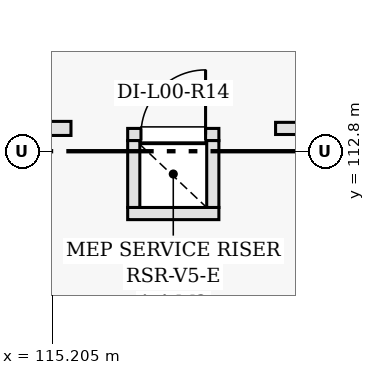
"""IFC4 building model, lengths in metres.
Left out: names, types, materials, properties, quantities, classifications, styles, units other than length and angle.
Written with IfcOpenShell. Run it as: python <this file> out.ifc"""

import sys

from ifc_helpers import new_model, si_unit, direction, frame, frame_2d, origin, place, context, subcontext, project, spatial, rectangle, extrude, element, fill, save


model = new_model("IFC4")
c1 = context("Model", 3, precision=1e-05, world=origin(), true_north=direction((0.0, 1.0)))
c2 = subcontext(c1, "Body", "Model", "MODEL_VIEW")
j1 = project(units=[si_unit("LENGTHUNIT", "METRE"), si_unit("PLANEANGLEUNIT", "RADIAN")], contexts=[c1])
p1 = place(None, origin())
s1 = spatial("IfcSite", under=j1, at=p1, CompositionType="ELEMENT")
p2 = place(p1, origin())
s2 = spatial("IfcBuilding", under=s1, at=p2, CompositionType="ELEMENT")
p3 = place(p2, origin())
s3 = spatial("IfcBuildingStorey", under=s2, at=p3, CompositionType="ELEMENT", Elevation=0.0)
p4 = place(p3, frame((116.2, 111.98, 0.0), z_axis=(0.0, 0.0, 1.0), x_axis=(1.0, 0.0, 0.0)))
e1 = element("IfcWall", 1, at=p4, inside=s3, PredefinedType="PARTITIONING", context=c2, shape_type="SweptSolid", body=[
    extrude(rectangle(XDim=1.2, YDim=0.16, at=frame_2d((0.6, 0.0))), origin(), (0.0, 0.0, 1.0), 4.52),
])
p5 = place(p3, frame((116.2, 113.02, 0.0), z_axis=(0.0, 0.0, 1.0), x_axis=(1.0, 0.0, 0.0)))
e2 = element("IfcWall", 2, at=p5, inside=s3, PredefinedType="PARTITIONING", context=c2, shape_type="SweptSolid", body=[
    extrude(rectangle(XDim=1.2, YDim=0.16, at=frame_2d((0.6, 0.0))), origin(), (0.0, 0.0, 1.0), 4.52),
])
p6 = place(p5, frame((0.175, 0.0, 0.0)))
e3 = element("IfcOpeningElement", 3, at=p6, cuts=e2, PredefinedType="OPENING", context=c2, shape_type="SweptSolid", body=[
    extrude(rectangle(XDim=0.85, YDim=2.02, at=frame_2d((0.425, 1.01))), frame((0.0, 0.09, 0.0), z_axis=(0.0, -1.0, 0.0), x_axis=(1.0, 0.0, 0.0)), (0.0, 0.0, 1.0), 0.18),
])
for number, where, z_axis, x_axis in (
    (4, (116.28, 112.06, 0.0), (0.0, 0.0, 1.0), (0.0, 1.0, 0.0)),
    (5, (117.32, 112.06, 0.0), (0.0, 0.0, 1.0), (0.0, 1.0, 0.0)),
):
    element("IfcWall", number, at=place(p3, frame(where, z_axis=z_axis, x_axis=x_axis)), inside=s3, PredefinedType="PARTITIONING", context=c2, shape_type="SweptSolid", body=[
        extrude(rectangle(XDim=0.88, YDim=0.16, at=frame_2d((0.44, 0.0))), origin(), (0.0, 0.0, 1.0), 4.52),
    ])
p7 = place(p3, frame((118.146, 113.1, 0.0), z_axis=(0.0, 0.0, 1.0), x_axis=(1.0, 0.0, 0.0)))
e6 = element("IfcWall", 6, at=p7, inside=s3, PredefinedType="PARTITIONING", context=c2, shape_type="SweptSolid", body=[
    extrude(rectangle(XDim=0.834, YDim=0.16, at=frame_2d((0.417, 0.0))), origin(), (0.0, 0.0, 1.0), 4.52),
])
p8 = place(p3, frame((102.487, 113.1, 0.0), z_axis=(0.0, 0.0, 1.0), x_axis=(1.0, 0.0, 0.0)))
e7 = element("IfcWall", 7, at=p8, inside=s3, PredefinedType="PARTITIONING", context=c2, shape_type="SweptSolid", body=[
    extrude(rectangle(XDim=12.967, YDim=0.185, at=frame_2d((6.483, 0.0))), origin(), (0.0, 0.0, 1.0), 3.605),
])
p9 = place(p6, origin())
e8 = element("IfcDoor", 8, at=p9, inside=s3, OperationType="SINGLE_SWING_RIGHT", PredefinedType="DOOR", context=c2, shape_type="SweptSolid", body=[
    extrude(rectangle(XDim=0.85, YDim=2.02, at=frame_2d((0.425, 1.01))), frame((0.0, 0.025, 0.0), z_axis=(0.0, -1.0, 0.0), x_axis=(1.0, 0.0, 0.0)), (0.0, 0.0, 1.0), 0.05),
])
fill(e3, e8)
save(model, sys.argv[1])
